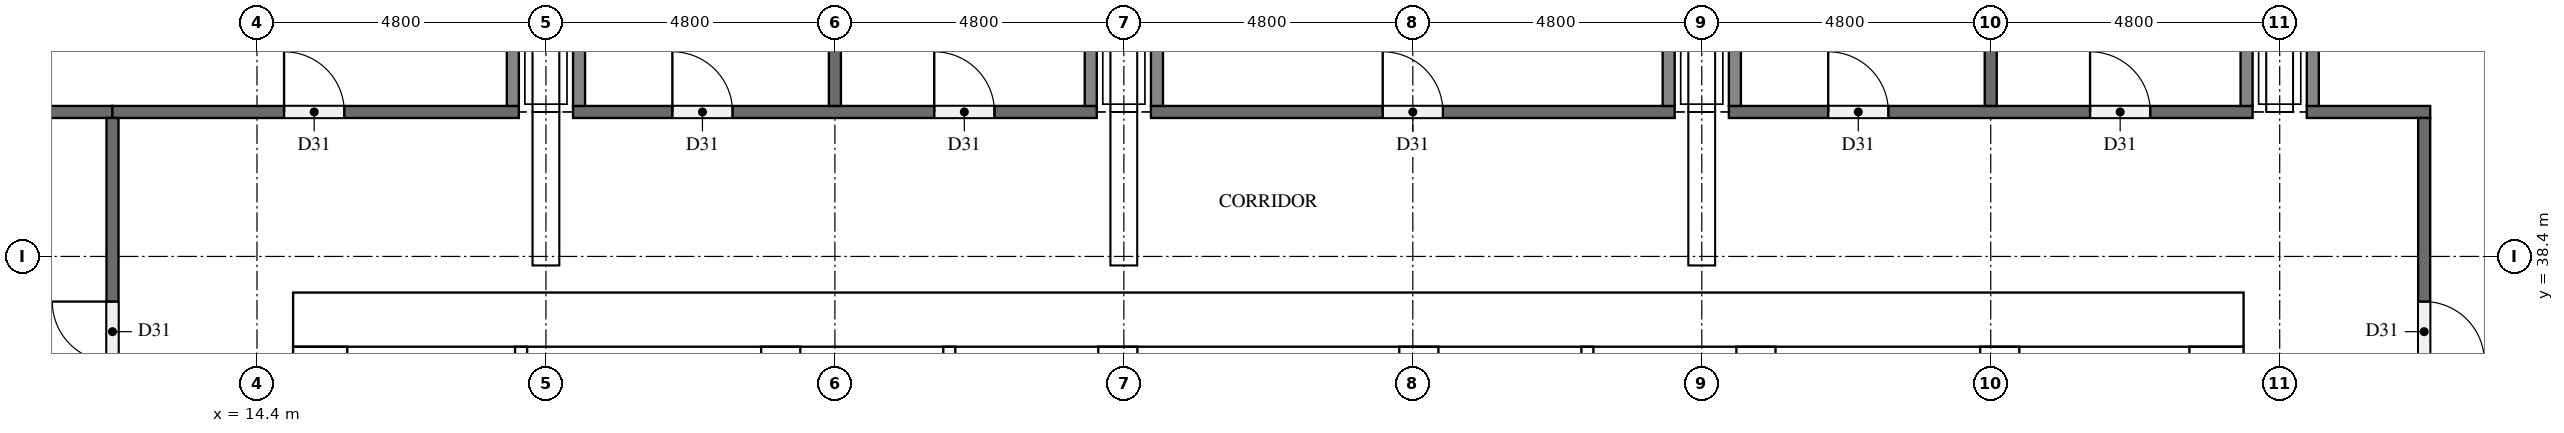
"""IFC4 building model, lengths in metres.
Left out: names, types, materials, properties, quantities, classifications, styles, units other than length and angle.
Written with IfcOpenShell. Run it as: python <this file> out.ifc"""

import sys

from ifc_helpers import new_model, si_unit, direction, frame, frame_2d, origin, place, context, subcontext, project, spatial, rectangle, extrude, element, fill, save


model = new_model("IFC4")
c1 = context("Model", 3, precision=1e-05, world=origin(), true_north=direction((0.0, 1.0)))
c2 = subcontext(c1, "Body", "Model", "MODEL_VIEW")
j1 = project(units=[si_unit("LENGTHUNIT", "METRE"), si_unit("PLANEANGLEUNIT", "RADIAN")], contexts=[c1])
p1 = place(None, origin())
s1 = spatial("IfcSite", under=j1, at=p1, CompositionType="ELEMENT")
p2 = place(p1, origin())
s2 = spatial("IfcBuilding", under=s1, at=p2, CompositionType="ELEMENT")
p3 = place(p2, frame((0.0, 0.0, 83.8)))
s3 = spatial("IfcBuildingStorey", under=s2, at=p3, CompositionType="ELEMENT", Elevation=83.8)
p4 = place(p3, frame((15.0, 37.35, 0.0), z_axis=(0.0, 0.0, 1.0), x_axis=(1.0, 0.0, 0.0)))
e1 = element("IfcWall", 1, at=p4, inside=s3, PredefinedType="SHEAR", context=c2, shape_type="SweptSolid", body=[
    extrude(rectangle(XDim=32.4, YDim=0.9, at=frame_2d((16.2, 0.0))), origin(), (0.0, 0.0, 1.0), 5.1),
])
p5 = place(p4, frame((15.3, 0.0, 0.0)))
e2 = element("IfcOpeningElement", 2, at=p5, cuts=e1, PredefinedType="OPENING", context=c2, shape_type="SweptSolid", body=[
    extrude(rectangle(XDim=1.8, YDim=2.1, at=frame_2d((0.9, 1.05))), frame((0.0, 0.46, 0.0), z_axis=(0.0, -1.0, 0.0), x_axis=(1.0, 0.0, 0.0)), (0.0, 0.0, 1.0), 0.92),
])
p6 = place(p4, frame((1.794, 0.0, 0.0)))
e3 = element("IfcOpeningElement", 3, at=p6, cuts=e1, PredefinedType="OPENING", context=c2, shape_type="SweptSolid", body=[
    extrude(rectangle(XDim=1.0, YDim=2.1, at=frame_2d((0.5, 1.05))), frame((0.0, 0.46, 0.0), z_axis=(0.0, -1.0, 0.0), x_axis=(1.0, 0.0, 0.0)), (0.0, 0.0, 1.0), 0.92),
])
p7 = place(p4, frame((5.331, 0.0, 0.0)))
e4 = element("IfcOpeningElement", 4, at=p7, cuts=e1, PredefinedType="OPENING", context=c2, shape_type="SweptSolid", body=[
    extrude(rectangle(XDim=1.0, YDim=2.1, at=frame_2d((0.5, 1.05))), frame((0.0, 0.46, 0.0), z_axis=(0.0, -1.0, 0.0), x_axis=(1.0, 0.0, 0.0)), (0.0, 0.0, 1.0), 0.92),
])
p8 = place(p3, frame((15.45, 15.9, 0.0), z_axis=(0.0, 0.0, 1.0), x_axis=(0.0, 1.0, 0.0)))
e5 = element("IfcWall", 5, at=p8, inside=s3, PredefinedType="SHEAR", context=c2, shape_type="SweptSolid", body=[
    extrude(rectangle(XDim=21.0, YDim=0.9, at=frame_2d((10.5, 0.0))), origin(), (0.0, 0.0, 1.0), 5.1),
])
p9 = place(p8, frame((4.86, 0.0, 0.0)))
e6 = element("IfcOpeningElement", 6, at=p9, cuts=e5, PredefinedType="OPENING", context=c2, shape_type="SweptSolid", body=[
    extrude(rectangle(XDim=1.2, YDim=2.1, at=frame_2d((0.6, 1.05))), frame((0.0, 0.46, 0.0), z_axis=(0.0, -1.0, 0.0), x_axis=(1.0, 0.0, 0.0)), (0.0, 0.0, 1.0), 0.92),
])
p10 = place(p3, frame((46.95, 15.9, 0.0), z_axis=(0.0, 0.0, 1.0), x_axis=(0.0, 1.0, 0.0)))
e7 = element("IfcWall", 7, at=p10, inside=s3, PredefinedType="SHEAR", context=c2, shape_type="SweptSolid", body=[
    extrude(rectangle(XDim=21.0, YDim=0.9, at=frame_2d((10.5, 0.0))), origin(), (0.0, 0.0, 1.0), 5.1),
])
p11 = place(p10, frame((10.2, 0.0, 0.0)))
e8 = element("IfcOpeningElement", 8, at=p11, cuts=e7, PredefinedType="OPENING", context=c2, shape_type="SweptSolid", body=[
    extrude(rectangle(XDim=1.2, YDim=2.1, at=frame_2d((0.6, 1.05))), frame((0.0, 0.46, 0.0), z_axis=(0.0, -1.0, 0.0), x_axis=(1.0, 0.0, 0.0)), (0.0, 0.0, 1.0), 0.92),
])
p12 = place(p3, frame((23.1, 15.9, 0.0), z_axis=(0.0, 0.0, 1.0), x_axis=(0.0, 1.0, 0.0)))
e9 = element("IfcWall", 9, at=p12, inside=s3, PredefinedType="SHEAR", context=c2, shape_type="SweptSolid", body=[
    extrude(rectangle(XDim=21.0, YDim=0.65, at=frame_2d((10.5, 0.0))), origin(), (0.0, 0.0, 1.0), 5.1),
])
p13 = place(p3, frame((39.3, 27.75, 0.0), z_axis=(0.0, 0.0, 1.0), x_axis=(0.0, 1.0, 0.0)))
e10 = element("IfcWall", 10, at=p13, inside=s3, PredefinedType="SHEAR", context=c2, shape_type="SweptSolid", body=[
    extrude(rectangle(XDim=9.15, YDim=0.65, at=frame_2d((4.575, 0.0))), origin(), (0.0, 0.0, 1.0), 5.1),
])
p14 = place(p3, frame((43.35, 27.75, 0.0), z_axis=(0.0, 0.0, 1.0), x_axis=(0.0, 1.0, 0.0)))
e11 = element("IfcWall", 11, at=p14, inside=s3, PredefinedType="SHEAR", context=c2, shape_type="SweptSolid", body=[
    extrude(rectangle(XDim=9.15, YDim=0.65, at=frame_2d((4.575, 0.0))), origin(), (0.0, 0.0, 1.0), 5.1),
])
p15 = place(p14, frame((7.65, 0.0, 0.0)))
e12 = element("IfcOpeningElement", 12, at=p15, cuts=e11, PredefinedType="OPENING", context=c2, shape_type="SweptSolid", body=[
    extrude(rectangle(XDim=1.2, YDim=2.1, at=frame_2d((0.6, 1.05))), frame((0.0, 0.335, 0.0), z_axis=(0.0, -1.0, 0.0), x_axis=(1.0, 0.0, 0.0)), (0.0, 0.0, 1.0), 0.67),
])
for number, where, z_axis, x_axis in (
    (13, (28.7, 33.875, 0.0), (0.0, 0.0, 1.0), (0.0, 1.0, 0.0)),
    (14, (33.7, 33.875, 0.0), (0.0, 0.0, 1.0), (0.0, 1.0, 0.0)),
):
    element("IfcWall", number, at=place(p3, frame(where, z_axis=z_axis, x_axis=x_axis)), inside=s3, PredefinedType="SHEAR", context=c2, shape_type="SweptSolid", body=[
        extrude(rectangle(XDim=3.025, YDim=0.65, at=frame_2d((1.512, 0.0))), origin(), (0.0, 0.0, 1.0), 5.1),
    ])
for number, where, z_axis, x_axis in (
    (15, (25.9, 33.875, 0.0), (0.0, 0.0, 1.0), (0.0, 1.0, 0.0)),
    (16, (36.5, 33.875, 0.0), (0.0, 0.0, 1.0), (0.0, 1.0, 0.0)),
):
    element("IfcWall", number, at=place(p3, frame(where, z_axis=z_axis, x_axis=x_axis)), inside=s3, PredefinedType="SOLIDWALL", context=c2, shape_type="SweptSolid", body=[
        extrude(rectangle(XDim=3.025, YDim=0.2, at=frame_2d((1.512, 0.0))), origin(), (0.0, 0.0, 1.0), 5.1),
    ])
p16 = place(p3, frame((18.788, 31.575, 0.0), z_axis=(0.0, 0.0, 1.0), x_axis=(0.0, 1.0, 0.0)))
e17 = element("IfcWall", 17, at=p16, inside=s3, PredefinedType="PARTITIONING", context=c2, shape_type="SweptSolid", body=[
    extrude(rectangle(XDim=5.325, YDim=0.2, at=frame_2d((2.663, 0.0))), origin(), (0.0, 0.0, 1.0), 5.1),
])
p17 = place(p3, frame((10.25, 40.8, 0.0), z_axis=(0.0, 0.0, 1.0), x_axis=(1.0, 0.0, 0.0)))
e18 = element("IfcWall", 18, at=p17, inside=s3, PredefinedType="PARTITIONING", context=c2, shape_type="SweptSolid", body=[
    extrude(rectangle(XDim=1.75, YDim=0.2, at=frame_2d((0.875, 0.0))), origin(), (0.0, 0.0, 1.0), 5.1),
])
p18 = place(p3, frame((12.0, 40.8, 0.0), z_axis=(0.0, 0.0, 1.0), x_axis=(1.0, 0.0, 0.0)))
e19 = element("IfcWall", 19, at=p18, inside=s3, PredefinedType="PARTITIONING", context=c2, shape_type="SweptSolid", body=[
    extrude(rectangle(XDim=6.75, YDim=0.2, at=frame_2d((3.375, 0.0))), origin(), (0.0, 0.0, 1.0), 5.1),
])
p19 = place(p18, frame((2.85, 0.0, 0.0)))
e20 = element("IfcOpeningElement", 20, at=p19, cuts=e19, PredefinedType="OPENING", context=c2, shape_type="SweptSolid", body=[
    extrude(rectangle(XDim=1.0, YDim=2.1, at=frame_2d((0.5, 1.05))), frame((0.0, 0.11, 0.0), z_axis=(0.0, -1.0, 0.0), x_axis=(1.0, 0.0, 0.0)), (0.0, 0.0, 1.0), 0.22),
])
p20 = place(p3, frame((19.65, 40.8, 0.0), z_axis=(0.0, 0.0, 1.0), x_axis=(1.0, 0.0, 0.0)))
e21 = element("IfcWall", 21, at=p20, inside=s3, PredefinedType="PARTITIONING", context=c2, shape_type="SweptSolid", body=[
    extrude(rectangle(XDim=8.7, YDim=0.2, at=frame_2d((4.35, 0.0))), origin(), (0.0, 0.0, 1.0), 5.1),
])
p21 = place(p20, frame((1.65, 0.0, 0.0)))
e22 = element("IfcOpeningElement", 22, at=p21, cuts=e21, PredefinedType="OPENING", context=c2, shape_type="SweptSolid", body=[
    extrude(rectangle(XDim=1.0, YDim=2.1, at=frame_2d((0.5, 1.05))), frame((0.0, 0.11, 0.0), z_axis=(0.0, -1.0, 0.0), x_axis=(1.0, 0.0, 0.0)), (0.0, 0.0, 1.0), 0.22),
])
p22 = place(p20, frame((6.0, 0.0, 0.0)))
e23 = element("IfcOpeningElement", 23, at=p22, cuts=e21, PredefinedType="OPENING", context=c2, shape_type="SweptSolid", body=[
    extrude(rectangle(XDim=1.0, YDim=2.1, at=frame_2d((0.5, 1.05))), frame((0.0, 0.11, 0.0), z_axis=(0.0, -1.0, 0.0), x_axis=(1.0, 0.0, 0.0)), (0.0, 0.0, 1.0), 0.22),
])
p23 = place(p3, frame((29.25, 40.8, 0.0), z_axis=(0.0, 0.0, 1.0), x_axis=(1.0, 0.0, 0.0)))
e24 = element("IfcWall", 24, at=p23, inside=s3, PredefinedType="PARTITIONING", context=c2, shape_type="SweptSolid", body=[
    extrude(rectangle(XDim=8.7, YDim=0.2, at=frame_2d((4.35, 0.0))), origin(), (0.0, 0.0, 1.0), 5.1),
])
p24 = place(p23, frame((3.85, 0.0, 0.0)))
e25 = element("IfcOpeningElement", 25, at=p24, cuts=e24, PredefinedType="OPENING", context=c2, shape_type="SweptSolid", body=[
    extrude(rectangle(XDim=1.0, YDim=2.1, at=frame_2d((0.5, 1.05))), frame((0.0, 0.11, 0.0), z_axis=(0.0, -1.0, 0.0), x_axis=(1.0, 0.0, 0.0)), (0.0, 0.0, 1.0), 0.22),
])
p25 = place(p3, frame((38.85, 40.8, 0.0), z_axis=(0.0, 0.0, 1.0), x_axis=(1.0, 0.0, 0.0)))
e26 = element("IfcWall", 26, at=p25, inside=s3, PredefinedType="PARTITIONING", context=c2, shape_type="SweptSolid", body=[
    extrude(rectangle(XDim=8.7, YDim=0.2, at=frame_2d((4.35, 0.0))), origin(), (0.0, 0.0, 1.0), 5.1),
])
p26 = place(p25, frame((1.65, 0.0, 0.0)))
e27 = element("IfcOpeningElement", 27, at=p26, cuts=e26, PredefinedType="OPENING", context=c2, shape_type="SweptSolid", body=[
    extrude(rectangle(XDim=1.0, YDim=2.1, at=frame_2d((0.5, 1.05))), frame((0.0, 0.11, 0.0), z_axis=(0.0, -1.0, 0.0), x_axis=(1.0, 0.0, 0.0)), (0.0, 0.0, 1.0), 0.22),
])
p27 = place(p25, frame((6.0, 0.0, 0.0)))
e28 = element("IfcOpeningElement", 28, at=p27, cuts=e26, PredefinedType="OPENING", context=c2, shape_type="SweptSolid", body=[
    extrude(rectangle(XDim=1.0, YDim=2.1, at=frame_2d((0.5, 1.05))), frame((0.0, 0.11, 0.0), z_axis=(0.0, -1.0, 0.0), x_axis=(1.0, 0.0, 0.0)), (0.0, 0.0, 1.0), 0.22),
])
p28 = place(p3, frame((48.45, 40.8, 0.0), z_axis=(0.0, 0.0, 1.0), x_axis=(1.0, 0.0, 0.0)))
e29 = element("IfcWall", 29, at=p28, inside=s3, PredefinedType="PARTITIONING", context=c2, shape_type="SweptSolid", body=[
    extrude(rectangle(XDim=2.05, YDim=0.2, at=frame_2d((1.025, 0.0))), origin(), (0.0, 0.0, 1.0), 5.1),
])
p29 = place(p3, frame((12.0, 12.1, 0.0), z_axis=(0.0, 0.0, 1.0), x_axis=(0.0, 1.0, 0.0)))
e30 = element("IfcWall", 30, at=p29, inside=s3, PredefinedType="PARTITIONING", context=c2, shape_type="SweptSolid", body=[
    extrude(rectangle(XDim=28.6, YDim=0.2, at=frame_2d((14.3, 0.0))), origin(), (0.0, 0.0, 1.0), 5.1),
])
p30 = place(p29, frame((3.05, 0.0, 0.0)))
e31 = element("IfcOpeningElement", 31, at=p30, cuts=e30, PredefinedType="OPENING", context=c2, shape_type="SweptSolid", body=[
    extrude(rectangle(XDim=1.0, YDim=2.1, at=frame_2d((0.5, 1.05))), frame((0.0, 0.11, 0.0), z_axis=(0.0, -1.0, 0.0), x_axis=(1.0, 0.0, 0.0)), (0.0, 0.0, 1.0), 0.22),
])
p31 = place(p29, frame((9.05, 0.0, 0.0)))
e32 = element("IfcOpeningElement", 32, at=p31, cuts=e30, PredefinedType="OPENING", context=c2, shape_type="SweptSolid", body=[
    extrude(rectangle(XDim=1.0, YDim=2.1, at=frame_2d((0.5, 1.05))), frame((0.0, 0.11, 0.0), z_axis=(0.0, -1.0, 0.0), x_axis=(1.0, 0.0, 0.0)), (0.0, 0.0, 1.0), 0.22),
])
p32 = place(p29, frame((13.85, 0.0, 0.0)))
e33 = element("IfcOpeningElement", 33, at=p32, cuts=e30, PredefinedType="OPENING", context=c2, shape_type="SweptSolid", body=[
    extrude(rectangle(XDim=1.0, YDim=2.1, at=frame_2d((0.5, 1.05))), frame((0.0, 0.11, 0.0), z_axis=(0.0, -1.0, 0.0), x_axis=(1.0, 0.0, 0.0)), (0.0, 0.0, 1.0), 0.22),
])
p33 = place(p29, frame((18.65, 0.0, 0.0)))
e34 = element("IfcOpeningElement", 34, at=p33, cuts=e30, PredefinedType="OPENING", context=c2, shape_type="SweptSolid", body=[
    extrude(rectangle(XDim=1.0, YDim=2.1, at=frame_2d((0.5, 1.05))), frame((0.0, 0.11, 0.0), z_axis=(0.0, -1.0, 0.0), x_axis=(1.0, 0.0, 0.0)), (0.0, 0.0, 1.0), 0.22),
])
p34 = place(p29, frame((24.55, 0.0, 0.0)))
e35 = element("IfcOpeningElement", 35, at=p34, cuts=e30, PredefinedType="OPENING", context=c2, shape_type="SweptSolid", body=[
    extrude(rectangle(XDim=1.0, YDim=2.1, at=frame_2d((0.5, 1.05))), frame((0.0, 0.11, 0.0), z_axis=(0.0, -1.0, 0.0), x_axis=(1.0, 0.0, 0.0)), (0.0, 0.0, 1.0), 0.22),
])
for number, where, z_axis, x_axis in (
    (36, (18.65, 40.9, 0.0), (0.0, 0.0, 1.0), (0.0, 1.0, 0.0)),
    (37, (19.75, 40.9, 0.0), (0.0, 0.0, 1.0), (0.0, 1.0, 0.0)),
    (38, (24.0, 40.9, 0.0), (0.0, 0.0, 1.0), (0.0, 1.0, 0.0)),
    (39, (28.25, 40.9, 0.0), (0.0, 0.0, 1.0), (0.0, 1.0, 0.0)),
    (40, (29.35, 40.9, 0.0), (0.0, 0.0, 1.0), (0.0, 1.0, 0.0)),
    (41, (37.85, 40.9, 0.0), (0.0, 0.0, 1.0), (0.0, 1.0, 0.0)),
    (42, (38.95, 40.9, 0.0), (0.0, 0.0, 1.0), (0.0, 1.0, 0.0)),
    (43, (43.2, 40.9, 0.0), (0.0, 0.0, 1.0), (0.0, 1.0, 0.0)),
    (44, (47.45, 40.9, 0.0), (0.0, 0.0, 1.0), (0.0, 1.0, 0.0)),
    (45, (48.55, 40.9, 0.0), (0.0, 0.0, 1.0), (0.0, 1.0, 0.0)),
):
    element("IfcWall", number, at=place(p3, frame(where, z_axis=z_axis, x_axis=x_axis)), inside=s3, PredefinedType="PARTITIONING", context=c2, shape_type="SweptSolid", body=[
        extrude(rectangle(XDim=9.6, YDim=0.2, at=frame_2d((4.8, 0.0))), origin(), (0.0, 0.0, 1.0), 5.1),
    ])
p35 = place(p3, frame((50.4, 40.7, 0.0), z_axis=(0.0, 0.0, 1.0), x_axis=(0.0, -1.0, 0.0)))
e46 = element("IfcWall", 46, at=p35, inside=s3, PredefinedType="PARTITIONING", context=c2, shape_type="SweptSolid", body=[
    extrude(rectangle(XDim=28.6, YDim=0.2, at=frame_2d((14.3, 0.0))), origin(), (0.0, 0.0, 1.0), 5.1),
])
p36 = place(p35, frame((24.55, 0.0, 0.0)))
e47 = element("IfcOpeningElement", 47, at=p36, cuts=e46, PredefinedType="OPENING", context=c2, shape_type="SweptSolid", body=[
    extrude(rectangle(XDim=1.0, YDim=2.1, at=frame_2d((0.5, 1.05))), frame((0.0, 0.11, 0.0), z_axis=(0.0, -1.0, 0.0), x_axis=(1.0, 0.0, 0.0)), (0.0, 0.0, 1.0), 0.22),
])
p37 = place(p35, frame((18.65, 0.0, 0.0)))
e48 = element("IfcOpeningElement", 48, at=p37, cuts=e46, PredefinedType="OPENING", context=c2, shape_type="SweptSolid", body=[
    extrude(rectangle(XDim=1.0, YDim=2.1, at=frame_2d((0.5, 1.05))), frame((0.0, 0.11, 0.0), z_axis=(0.0, -1.0, 0.0), x_axis=(1.0, 0.0, 0.0)), (0.0, 0.0, 1.0), 0.22),
])
p38 = place(p35, frame((13.85, 0.0, 0.0)))
e49 = element("IfcOpeningElement", 49, at=p38, cuts=e46, PredefinedType="OPENING", context=c2, shape_type="SweptSolid", body=[
    extrude(rectangle(XDim=1.0, YDim=2.1, at=frame_2d((0.5, 1.05))), frame((0.0, 0.11, 0.0), z_axis=(0.0, -1.0, 0.0), x_axis=(1.0, 0.0, 0.0)), (0.0, 0.0, 1.0), 0.22),
])
p39 = place(p35, frame((9.05, 0.0, 0.0)))
e50 = element("IfcOpeningElement", 50, at=p39, cuts=e46, PredefinedType="OPENING", context=c2, shape_type="SweptSolid", body=[
    extrude(rectangle(XDim=1.0, YDim=2.1, at=frame_2d((0.5, 1.05))), frame((0.0, 0.11, 0.0), z_axis=(0.0, -1.0, 0.0), x_axis=(1.0, 0.0, 0.0)), (0.0, 0.0, 1.0), 0.22),
])
p40 = place(p35, frame((3.05, 0.0, 0.0)))
e51 = element("IfcOpeningElement", 51, at=p40, cuts=e46, PredefinedType="OPENING", context=c2, shape_type="SweptSolid", body=[
    extrude(rectangle(XDim=1.0, YDim=2.1, at=frame_2d((0.5, 1.05))), frame((0.0, 0.11, 0.0), z_axis=(0.0, -1.0, 0.0), x_axis=(1.0, 0.0, 0.0)), (0.0, 0.0, 1.0), 0.22),
])
p41 = place(p5, origin())
e52 = element("IfcDoor", 52, at=p41, inside=s3, OperationType="DOUBLE_DOOR_SINGLE_SWING", PredefinedType="DOOR", context=c2, shape_type="SweptSolid", body=[
    extrude(rectangle(XDim=1.8, YDim=2.1, at=frame_2d((0.9, 1.05))), frame((0.0, 0.025, 0.0), z_axis=(0.0, -1.0, 0.0), x_axis=(1.0, 0.0, 0.0)), (0.0, 0.0, 1.0), 0.05),
])
fill(e2, e52)
p42 = place(p6, origin())
e53 = element("IfcDoor", 53, at=p42, inside=s3, OperationType="SINGLE_SWING_RIGHT", PredefinedType="DOOR", context=c2, shape_type="SweptSolid", body=[
    extrude(rectangle(XDim=1.0, YDim=2.1, at=frame_2d((0.5, 1.05))), frame((0.0, 0.025, 0.0), z_axis=(0.0, -1.0, 0.0), x_axis=(1.0, 0.0, 0.0)), (0.0, 0.0, 1.0), 0.05),
])
fill(e3, e53)
p43 = place(p7, origin())
e54 = element("IfcDoor", 54, at=p43, inside=s3, OperationType="SINGLE_SWING_LEFT", PredefinedType="DOOR", context=c2, shape_type="SweptSolid", body=[
    extrude(rectangle(XDim=1.0, YDim=2.1, at=frame_2d((0.5, 1.05))), frame((0.0, 0.025, 0.0), z_axis=(0.0, -1.0, 0.0), x_axis=(1.0, 0.0, 0.0)), (0.0, 0.0, 1.0), 0.05),
])
fill(e4, e54)
p44 = place(p19, origin())
e55 = element("IfcDoor", 55, at=p44, inside=s3, OperationType="SINGLE_SWING_LEFT", PredefinedType="DOOR", context=c2, shape_type="SweptSolid", body=[
    extrude(rectangle(XDim=1.0, YDim=2.1, at=frame_2d((0.5, 1.05))), frame((0.0, 0.025, 0.0), z_axis=(0.0, -1.0, 0.0), x_axis=(1.0, 0.0, 0.0)), (0.0, 0.0, 1.0), 0.05),
])
fill(e20, e55)
p45 = place(p21, origin())
e56 = element("IfcDoor", 56, at=p45, inside=s3, OperationType="SINGLE_SWING_LEFT", PredefinedType="DOOR", context=c2, shape_type="SweptSolid", body=[
    extrude(rectangle(XDim=1.0, YDim=2.1, at=frame_2d((0.5, 1.05))), frame((0.0, 0.025, 0.0), z_axis=(0.0, -1.0, 0.0), x_axis=(1.0, 0.0, 0.0)), (0.0, 0.0, 1.0), 0.05),
])
fill(e22, e56)
p46 = place(p22, origin())
e57 = element("IfcDoor", 57, at=p46, inside=s3, OperationType="SINGLE_SWING_LEFT", PredefinedType="DOOR", context=c2, shape_type="SweptSolid", body=[
    extrude(rectangle(XDim=1.0, YDim=2.1, at=frame_2d((0.5, 1.05))), frame((0.0, 0.025, 0.0), z_axis=(0.0, -1.0, 0.0), x_axis=(1.0, 0.0, 0.0)), (0.0, 0.0, 1.0), 0.05),
])
fill(e23, e57)
p47 = place(p24, origin())
e58 = element("IfcDoor", 58, at=p47, inside=s3, OperationType="SINGLE_SWING_LEFT", PredefinedType="DOOR", context=c2, shape_type="SweptSolid", body=[
    extrude(rectangle(XDim=1.0, YDim=2.1, at=frame_2d((0.5, 1.05))), frame((0.0, 0.025, 0.0), z_axis=(0.0, -1.0, 0.0), x_axis=(1.0, 0.0, 0.0)), (0.0, 0.0, 1.0), 0.05),
])
fill(e25, e58)
p48 = place(p26, origin())
e59 = element("IfcDoor", 59, at=p48, inside=s3, OperationType="SINGLE_SWING_LEFT", PredefinedType="DOOR", context=c2, shape_type="SweptSolid", body=[
    extrude(rectangle(XDim=1.0, YDim=2.1, at=frame_2d((0.5, 1.05))), frame((0.0, 0.025, 0.0), z_axis=(0.0, -1.0, 0.0), x_axis=(1.0, 0.0, 0.0)), (0.0, 0.0, 1.0), 0.05),
])
fill(e27, e59)
p49 = place(p27, origin())
e60 = element("IfcDoor", 60, at=p49, inside=s3, OperationType="SINGLE_SWING_LEFT", PredefinedType="DOOR", context=c2, shape_type="SweptSolid", body=[
    extrude(rectangle(XDim=1.0, YDim=2.1, at=frame_2d((0.5, 1.05))), frame((0.0, 0.025, 0.0), z_axis=(0.0, -1.0, 0.0), x_axis=(1.0, 0.0, 0.0)), (0.0, 0.0, 1.0), 0.05),
])
fill(e28, e60)
p50 = place(p40, origin())
e61 = element("IfcDoor", 61, at=p50, inside=s3, OperationType="SINGLE_SWING_RIGHT", PredefinedType="DOOR", context=c2, shape_type="SweptSolid", body=[
    extrude(rectangle(XDim=1.0, YDim=2.1, at=frame_2d((0.5, 1.05))), frame((0.0, 0.025, 0.0), z_axis=(0.0, -1.0, 0.0), x_axis=(1.0, 0.0, 0.0)), (0.0, 0.0, 1.0), 0.05),
])
fill(e51, e61)
p51 = place(p34, origin())
e62 = element("IfcDoor", 62, at=p51, inside=s3, OperationType="SINGLE_SWING_RIGHT", PredefinedType="DOOR", context=c2, shape_type="SweptSolid", body=[
    extrude(rectangle(XDim=1.0, YDim=2.1, at=frame_2d((0.5, 1.05))), frame((0.0, 0.025, 0.0), z_axis=(0.0, -1.0, 0.0), x_axis=(1.0, 0.0, 0.0)), (0.0, 0.0, 1.0), 0.05),
])
fill(e35, e62)
save(model, sys.argv[1])
